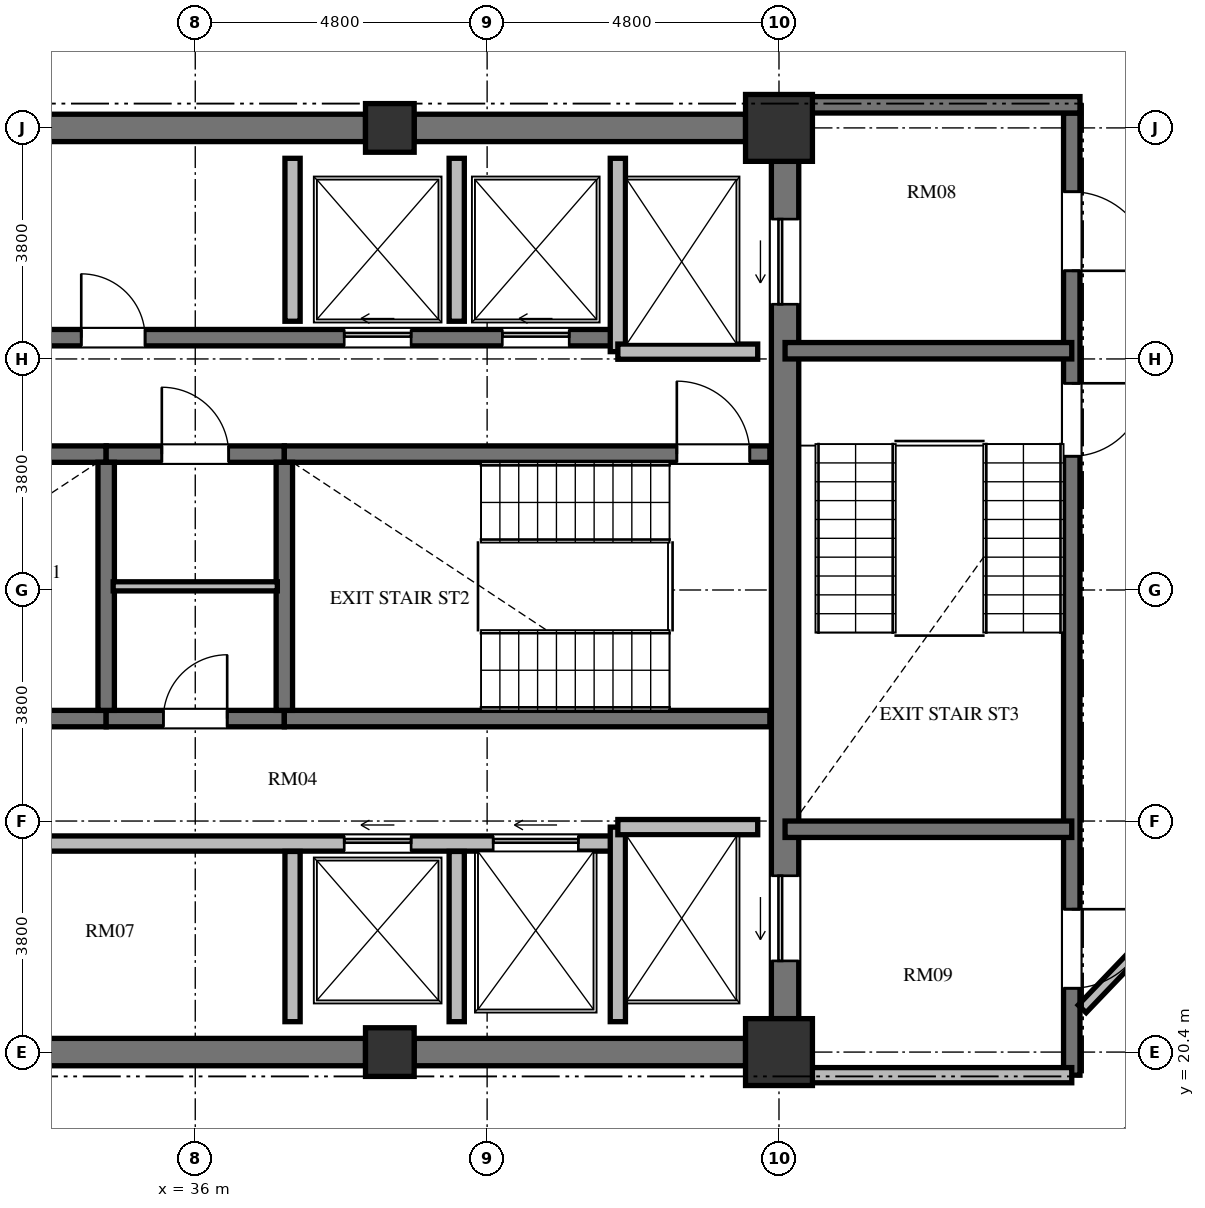
"""IFC4 building model, lengths in metres.
Left out: names, types, materials, properties, quantities, classifications, styles, units other than length and angle.
Written with IfcOpenShell. Run it as: python <this file> out.ifc"""

import sys

from ifc_helpers import new_model, si_unit, direction, frame, frame_2d, origin, origin_2d, place, context, subcontext, project, spatial, rectangle, extrude, element, fill, save


model = new_model("IFC4")
c1 = context("Model", 3, precision=1e-05, world=origin(), true_north=direction((0.0, 1.0)))
c2 = subcontext(c1, "Body", "Model", "MODEL_VIEW")
j1 = project(units=[si_unit("LENGTHUNIT", "METRE"), si_unit("PLANEANGLEUNIT", "RADIAN")], contexts=[c1])
p1 = place(None, origin())
s1 = spatial("IfcSite", under=j1, at=p1, CompositionType="ELEMENT")
p2 = place(p1, origin())
s2 = spatial("IfcBuilding", under=s1, at=p2, CompositionType="ELEMENT")
p3 = place(p2, frame((0.0, 0.0, 255.024)))
s3 = spatial("IfcBuildingStorey", under=s2, at=p3, CompositionType="ELEMENT", Elevation=255.024)
p4 = place(p3, frame((39.2, 20.4, 0.0), z_axis=(0.0, 0.0, 1.0), x_axis=(1.0, 0.0, 0.0)))
e1 = element("IfcColumn", 1, at=p4, inside=s3, PredefinedType="COLUMN", context=c2, shape_type="SweptSolid", body=[
    extrude(rectangle(XDim=0.8, YDim=0.8, at=origin_2d()), origin(), (0.0, 0.0, 1.0), 3.648),
])
for number, where, z_axis, x_axis in (
    (2, (45.6, 20.4, 0.0), (0.0, 0.0, 1.0), (1.0, 0.0, 0.0)),
    (3, (45.6, 35.6, 0.0), (0.0, 0.0, 1.0), (1.0, 0.0, 0.0)),
):
    element("IfcColumn", number, at=place(p3, frame(where, z_axis=z_axis, x_axis=x_axis)), inside=s3, PredefinedType="COLUMN", context=c2, shape_type="SweptSolid", body=[
        extrude(rectangle(XDim=1.1, YDim=1.1, at=origin_2d()), origin(), (0.0, 0.0, 1.0), 3.648),
    ])
p5 = place(p3, frame((39.2, 35.6, 0.0), z_axis=(0.0, 0.0, 1.0), x_axis=(1.0, 0.0, 0.0)))
e4 = element("IfcColumn", 4, at=p5, inside=s3, PredefinedType="COLUMN", context=c2, shape_type="SweptSolid", body=[
    extrude(rectangle(XDim=0.8, YDim=0.8, at=origin_2d()), origin(), (0.0, 0.0, 1.0), 3.648),
])
p6 = place(p3, frame((45.7, 20.95, 0.0), z_axis=(0.0, 0.0, 1.0), x_axis=(0.0, 1.0, 0.0)))
e5 = element("IfcWall", 5, at=p6, inside=s3, PredefinedType="SHEAR", context=c2, shape_type="SweptSolid", body=[
    extrude(rectangle(XDim=14.1, YDim=0.45, at=frame_2d((7.05, 0.0))), origin(), (0.0, 0.0, 1.0), 3.648),
])
p7 = place(p6, frame((11.75, 0.0, 0.0)))
e6 = element("IfcOpeningElement", 6, at=p7, cuts=e5, PredefinedType="OPENING", context=c2, shape_type="SweptSolid", body=[
    extrude(rectangle(XDim=1.4, YDim=2.3, at=frame_2d((0.7, 1.15))), frame((0.0, 0.235, 0.0), z_axis=(0.0, -1.0, 0.0), x_axis=(1.0, 0.0, 0.0)), (0.0, 0.0, 1.0), 0.47),
])
p8 = place(p6, frame((0.95, 0.0, 0.0)))
e7 = element("IfcOpeningElement", 7, at=p8, cuts=e5, PredefinedType="OPENING", context=c2, shape_type="SweptSolid", body=[
    extrude(rectangle(XDim=1.4, YDim=2.3, at=frame_2d((0.7, 1.15))), frame((0.0, 0.235, 0.0), z_axis=(0.0, -1.0, 0.0), x_axis=(1.0, 0.0, 0.0)), (0.0, 0.0, 1.0), 0.47),
])
for number, where, z_axis, x_axis in (
    (8, (33.2, 20.4, 0.0), (0.0, 0.0, 1.0), (1.0, 0.0, 0.0)),
    (9, (33.2, 35.6, 0.0), (0.0, 0.0, 1.0), (1.0, 0.0, 0.0)),
):
    element("IfcWall", number, at=place(p3, frame(where, z_axis=z_axis, x_axis=x_axis)), inside=s3, PredefinedType="SHEAR", context=c2, shape_type="SweptSolid", body=[
        extrude(rectangle(XDim=5.6, YDim=0.45, at=frame_2d((2.8, 0.0))), origin(), (0.0, 0.0, 1.0), 3.648),
    ])
for number, where, z_axis, x_axis in (
    (10, (39.6, 20.4, 0.0), (0.0, 0.0, 1.0), (1.0, 0.0, 0.0)),
    (11, (39.6, 35.6, 0.0), (0.0, 0.0, 1.0), (1.0, 0.0, 0.0)),
):
    element("IfcWall", number, at=place(p3, frame(where, z_axis=z_axis, x_axis=x_axis)), inside=s3, PredefinedType="SHEAR", context=c2, shape_type="SweptSolid", body=[
        extrude(rectangle(XDim=5.45, YDim=0.45, at=frame_2d((2.725, 0.0))), origin(), (0.0, 0.0, 1.0), 3.648),
    ])
p9 = place(p3, frame((26.55, 30.235, 0.0), z_axis=(0.0, 0.0, 1.0), x_axis=(1.0, 0.0, 0.0)))
e12 = element("IfcWall", 12, at=p9, inside=s3, PredefinedType="SHEAR", context=c2, shape_type="SweptSolid", body=[
    extrude(rectangle(XDim=7.985, YDim=0.27, at=frame_2d((3.992, 0.0))), origin(), (0.0, 0.0, 1.0), 3.648),
])
p10 = place(p3, frame((34.535, 30.235, 0.0), z_axis=(0.0, 0.0, 1.0), x_axis=(1.0, 0.0, 0.0)))
e13 = element("IfcWall", 13, at=p10, inside=s3, PredefinedType="SHEAR", context=c2, shape_type="SweptSolid", body=[
    extrude(rectangle(XDim=2.93, YDim=0.27, at=frame_2d((1.465, 0.0))), origin(), (0.0, 0.0, 1.0), 3.648),
])
p11 = place(p10, frame((0.915, 0.0, 0.0)))
e14 = element("IfcOpeningElement", 14, at=p11, cuts=e13, PredefinedType="OPENING", context=c2, shape_type="SweptSolid", body=[
    extrude(rectangle(XDim=1.1, YDim=2.15, at=frame_2d((0.55, 1.075))), frame((0.0, 0.145, 0.0), z_axis=(0.0, -1.0, 0.0), x_axis=(1.0, 0.0, 0.0)), (0.0, 0.0, 1.0), 0.29),
])
p12 = place(p3, frame((37.465, 30.235, 0.0), z_axis=(0.0, 0.0, 1.0), x_axis=(1.0, 0.0, 0.0)))
e15 = element("IfcWall", 15, at=p12, inside=s3, PredefinedType="SHEAR", context=c2, shape_type="SweptSolid", body=[
    extrude(rectangle(XDim=7.985, YDim=0.27, at=frame_2d((3.992, 0.0))), origin(), (0.0, 0.0, 1.0), 3.648),
])
p13 = place(p12, frame((6.455, 0.0, 0.0)))
e16 = element("IfcOpeningElement", 16, at=p13, cuts=e15, PredefinedType="OPENING", context=c2, shape_type="SweptSolid", body=[
    extrude(rectangle(XDim=1.2, YDim=2.15, at=frame_2d((0.6, 1.075))), frame((0.0, 0.145, 0.0), z_axis=(0.0, -1.0, 0.0), x_axis=(1.0, 0.0, 0.0)), (0.0, 0.0, 1.0), 0.29),
])
p14 = place(p3, frame((26.55, 25.885, 0.0), z_axis=(0.0, 0.0, 1.0), x_axis=(1.0, 0.0, 0.0)))
e17 = element("IfcWall", 17, at=p14, inside=s3, PredefinedType="SHEAR", context=c2, shape_type="SweptSolid", body=[
    extrude(rectangle(XDim=7.985, YDim=0.27, at=frame_2d((3.992, 0.0))), origin(), (0.0, 0.0, 1.0), 3.648),
])
p15 = place(p3, frame((34.535, 25.885, 0.0), z_axis=(0.0, 0.0, 1.0), x_axis=(1.0, 0.0, 0.0)))
e18 = element("IfcWall", 18, at=p15, inside=s3, PredefinedType="SHEAR", context=c2, shape_type="SweptSolid", body=[
    extrude(rectangle(XDim=2.93, YDim=0.27, at=frame_2d((1.465, 0.0))), origin(), (0.0, 0.0, 1.0), 3.648),
])
p16 = place(p15, frame((0.94, 0.0, 0.0)))
e19 = element("IfcOpeningElement", 19, at=p16, cuts=e18, PredefinedType="OPENING", context=c2, shape_type="SweptSolid", body=[
    extrude(rectangle(XDim=1.05, YDim=2.15, at=frame_2d((0.525, 1.075))), frame((0.0, 0.145, 0.0), z_axis=(0.0, -1.0, 0.0), x_axis=(1.0, 0.0, 0.0)), (0.0, 0.0, 1.0), 0.29),
])
p17 = place(p3, frame((37.465, 25.885, 0.0), z_axis=(0.0, 0.0, 1.0), x_axis=(1.0, 0.0, 0.0)))
e20 = element("IfcWall", 20, at=p17, inside=s3, PredefinedType="SHEAR", context=c2, shape_type="SweptSolid", body=[
    extrude(rectangle(XDim=7.985, YDim=0.27, at=frame_2d((3.992, 0.0))), origin(), (0.0, 0.0, 1.0), 3.648),
])
for number, where, z_axis, x_axis in (
    (21, (34.535, 26.02, 0.0), (0.0, 0.0, 1.0), (0.0, 1.0, 0.0)),
    (22, (37.465, 26.02, 0.0), (0.0, 0.0, 1.0), (0.0, 1.0, 0.0)),
):
    element("IfcWall", number, at=place(p3, frame(where, z_axis=z_axis, x_axis=x_axis)), inside=s3, PredefinedType="SHEAR", context=c2, shape_type="SweptSolid", body=[
        extrude(rectangle(XDim=4.08, YDim=0.27, at=frame_2d((2.04, 0.0))), origin(), (0.0, 0.0, 1.0), 3.648),
    ])
p18 = place(p3, frame((34.65, 28.06, 0.0), z_axis=(0.0, 0.0, 1.0), x_axis=(1.0, 0.0, 0.0)))
e23 = element("IfcWall", 23, at=p18, inside=s3, PredefinedType="PARTITIONING", context=c2, shape_type="SweptSolid", body=[
    extrude(rectangle(XDim=2.7, YDim=0.15, at=frame_2d((1.35, 0.0))), origin(), (0.0, 0.0, 1.0), 3.448),
])
p19 = place(p3, frame((26.55, 32.15, 0.0), z_axis=(0.0, 0.0, 1.0), x_axis=(1.0, 0.0, 0.0)))
e24 = element("IfcWall", 24, at=p19, inside=s3, PredefinedType="SHEAR", context=c2, shape_type="SweptSolid", body=[
    extrude(rectangle(XDim=16.4, YDim=0.27, at=frame_2d((8.2, 0.0))), origin(), (0.0, 0.0, 1.0), 3.648),
])
p20 = place(p19, frame((2.175, 0.0, 0.0)))
e25 = element("IfcOpeningElement", 25, at=p20, cuts=e24, PredefinedType="OPENING", context=c2, shape_type="SweptSolid", body=[
    extrude(rectangle(XDim=1.05, YDim=2.15, at=frame_2d((0.525, 1.075))), frame((0.0, 0.145, 0.0), z_axis=(0.0, -1.0, 0.0), x_axis=(1.0, 0.0, 0.0)), (0.0, 0.0, 1.0), 0.29),
])
p21 = place(p19, frame((7.575, 0.0, 0.0)))
e26 = element("IfcOpeningElement", 26, at=p21, cuts=e24, PredefinedType="OPENING", context=c2, shape_type="SweptSolid", body=[
    extrude(rectangle(XDim=1.05, YDim=2.15, at=frame_2d((0.525, 1.075))), frame((0.0, 0.145, 0.0), z_axis=(0.0, -1.0, 0.0), x_axis=(1.0, 0.0, 0.0)), (0.0, 0.0, 1.0), 0.29),
])
p22 = place(p19, frame((11.9, 0.0, 0.0)))
e27 = element("IfcOpeningElement", 27, at=p22, cuts=e24, PredefinedType="OPENING", context=c2, shape_type="SweptSolid", body=[
    extrude(rectangle(XDim=1.1, YDim=2.2, at=frame_2d((0.55, 1.1))), frame((0.0, 0.145, 0.0), z_axis=(0.0, -1.0, 0.0), x_axis=(1.0, 0.0, 0.0)), (0.0, 0.0, 1.0), 0.29),
])
p23 = place(p19, frame((14.5, 0.0, 0.0)))
e28 = element("IfcOpeningElement", 28, at=p23, cuts=e24, PredefinedType="OPENING", context=c2, shape_type="SweptSolid", body=[
    extrude(rectangle(XDim=1.1, YDim=2.2, at=frame_2d((0.55, 1.1))), frame((0.0, 0.145, 0.0), z_axis=(0.0, -1.0, 0.0), x_axis=(1.0, 0.0, 0.0)), (0.0, 0.0, 1.0), 0.29),
])
p24 = place(p3, frame((26.75, 23.83, 0.0), z_axis=(0.0, 0.0, 1.0), x_axis=(1.0, 0.0, 0.0)))
e29 = element("IfcWall", 29, at=p24, inside=s3, PredefinedType="SOLIDWALL", context=c2, shape_type="SweptSolid", body=[
    extrude(rectangle(XDim=16.2, YDim=0.25, at=frame_2d((8.1, 0.0))), origin(), (0.0, 0.0, 1.0), 3.448),
])
p25 = place(p24, frame((4.75, 0.0, 0.0)))
e30 = element("IfcOpeningElement", 30, at=p25, cuts=e29, PredefinedType="OPENING", context=c2, shape_type="SweptSolid", body=[
    extrude(rectangle(XDim=1.4, YDim=2.2, at=frame_2d((0.7, 1.1))), frame((0.0, 0.135, 0.0), z_axis=(0.0, -1.0, 0.0), x_axis=(1.0, 0.0, 0.0)), (0.0, 0.0, 1.0), 0.27),
])
p26 = place(p24, frame((11.7, 0.0, 0.0)))
e31 = element("IfcOpeningElement", 31, at=p26, cuts=e29, PredefinedType="OPENING", context=c2, shape_type="SweptSolid", body=[
    extrude(rectangle(XDim=1.1, YDim=2.2, at=frame_2d((0.55, 1.1))), frame((0.0, 0.135, 0.0), z_axis=(0.0, -1.0, 0.0), x_axis=(1.0, 0.0, 0.0)), (0.0, 0.0, 1.0), 0.27),
])
p27 = place(p24, frame((14.15, 0.0, 0.0)))
e32 = element("IfcOpeningElement", 32, at=p27, cuts=e29, PredefinedType="OPENING", context=c2, shape_type="SweptSolid", body=[
    extrude(rectangle(XDim=1.4, YDim=2.3, at=frame_2d((0.7, 1.15))), frame((0.0, 0.135, 0.0), z_axis=(0.0, -1.0, 0.0), x_axis=(1.0, 0.0, 0.0)), (0.0, 0.0, 1.0), 0.27),
])
p28 = place(p3, frame((42.95, 31.92, 0.0), z_axis=(0.0, 0.0, 1.0), x_axis=(0.0, 1.0, 0.0)))
e33 = element("IfcWall", 33, at=p28, inside=s3, PredefinedType="SOLIDWALL", context=c2, shape_type="SweptSolid", body=[
    extrude(rectangle(XDim=3.18, YDim=0.25, at=frame_2d((1.59, 0.0))), origin(), (0.0, 0.0, 1.0), 3.448),
])
p29 = place(p3, frame((42.95, 31.92, 0.0), z_axis=(0.0, 0.0, 1.0), x_axis=(1.0, 0.0, 0.0)))
e34 = element("IfcWall", 34, at=p29, inside=s3, PredefinedType="SOLIDWALL", context=c2, shape_type="SweptSolid", body=[
    extrude(rectangle(XDim=2.3, YDim=0.25, at=frame_2d((1.15, 0.0))), origin(), (0.0, 0.0, 1.0), 3.448),
])
p30 = place(p3, frame((42.95, 20.9, 0.0), z_axis=(0.0, 0.0, 1.0), x_axis=(0.0, 1.0, 0.0)))
e35 = element("IfcWall", 35, at=p30, inside=s3, PredefinedType="SOLIDWALL", context=c2, shape_type="SweptSolid", body=[
    extrude(rectangle(XDim=3.2, YDim=0.25, at=frame_2d((1.6, 0.0))), origin(), (0.0, 0.0, 1.0), 3.448),
])
p31 = place(p3, frame((42.95, 24.1, 0.0), z_axis=(0.0, 0.0, 1.0), x_axis=(1.0, 0.0, 0.0)))
e36 = element("IfcWall", 36, at=p31, inside=s3, PredefinedType="SOLIDWALL", context=c2, shape_type="SweptSolid", body=[
    extrude(rectangle(XDim=2.3, YDim=0.25, at=frame_2d((1.15, 0.0))), origin(), (0.0, 0.0, 1.0), 3.448),
])
p32 = place(p3, frame((37.6, 32.42, 0.0), z_axis=(0.0, 0.0, 1.0), x_axis=(0.0, 1.0, 0.0)))
e37 = element("IfcWall", 37, at=p32, inside=s3, PredefinedType="SOLIDWALL", context=c2, shape_type="SweptSolid", body=[
    extrude(rectangle(XDim=2.68, YDim=0.25, at=frame_2d((1.34, 0.0))), origin(), (0.0, 0.0, 1.0), 3.448),
])
p33 = place(p3, frame((37.6, 20.9, 0.0), z_axis=(0.0, 0.0, 1.0), x_axis=(0.0, 1.0, 0.0)))
e38 = element("IfcWall", 38, at=p33, inside=s3, PredefinedType="SOLIDWALL", context=c2, shape_type="SweptSolid", body=[
    extrude(rectangle(XDim=2.8, YDim=0.25, at=frame_2d((1.4, 0.0))), origin(), (0.0, 0.0, 1.0), 3.448),
])
p34 = place(p3, frame((40.3, 32.42, 0.0), z_axis=(0.0, 0.0, 1.0), x_axis=(0.0, 1.0, 0.0)))
e39 = element("IfcWall", 39, at=p34, inside=s3, PredefinedType="SOLIDWALL", context=c2, shape_type="SweptSolid", body=[
    extrude(rectangle(XDim=2.68, YDim=0.25, at=frame_2d((1.34, 0.0))), origin(), (0.0, 0.0, 1.0), 3.448),
])
p35 = place(p3, frame((40.3, 20.9, 0.0), z_axis=(0.0, 0.0, 1.0), x_axis=(0.0, 1.0, 0.0)))
e40 = element("IfcWall", 40, at=p35, inside=s3, PredefinedType="SOLIDWALL", context=c2, shape_type="SweptSolid", body=[
    extrude(rectangle(XDim=2.8, YDim=0.25, at=frame_2d((1.4, 0.0))), origin(), (0.0, 0.0, 1.0), 3.448),
])
p36 = place(p3, frame((50.415, 35.845, 0.0), z_axis=(0.0, 0.0, 1.0), x_axis=(0.0, -1.0, 0.0)))
e41 = element("IfcWall", 41, at=p36, inside=s3, PredefinedType="SHEAR", context=c2, shape_type="SweptSolid", body=[
    extrude(rectangle(XDim=15.825, YDim=0.27, at=frame_2d((7.913, 0.0))), origin(), (0.0, 0.0, 1.0), 3.648),
])
p37 = place(p36, frame((4.445, 0.0, 0.0)))
e42 = element("IfcOpeningElement", 42, at=p37, cuts=e41, PredefinedType="OPENING", context=c2, shape_type="SweptSolid", body=[
    extrude(rectangle(XDim=1.2, YDim=2.15, at=frame_2d((0.6, 1.075))), frame((0.0, 0.145, 0.0), z_axis=(0.0, -1.0, 0.0), x_axis=(1.0, 0.0, 0.0)), (0.0, 0.0, 1.0), 0.29),
])
p38 = place(p36, frame((1.295, 0.0, 0.0)))
e43 = element("IfcOpeningElement", 43, at=p38, cuts=e41, PredefinedType="OPENING", context=c2, shape_type="SweptSolid", body=[
    extrude(rectangle(XDim=1.3, YDim=2.2, at=frame_2d((0.65, 1.1))), frame((0.0, 0.145, 0.0), z_axis=(0.0, -1.0, 0.0), x_axis=(1.0, 0.0, 0.0)), (0.0, 0.0, 1.0), 0.29),
])
p39 = place(p36, frame((13.095, 0.0, 0.0)))
e44 = element("IfcOpeningElement", 44, at=p39, cuts=e41, PredefinedType="OPENING", context=c2, shape_type="SweptSolid", body=[
    extrude(rectangle(XDim=1.3, YDim=2.2, at=frame_2d((0.65, 1.1))), frame((0.0, 0.145, 0.0), z_axis=(0.0, -1.0, 0.0), x_axis=(1.0, 0.0, 0.0)), (0.0, 0.0, 1.0), 0.29),
])
p40 = place(p3, frame((45.925, 35.98, 0.0), z_axis=(0.0, 0.0, 1.0), x_axis=(1.0, 0.0, 0.0)))
e45 = element("IfcWall", 45, at=p40, inside=s3, PredefinedType="SHEAR", context=c2, shape_type="SweptSolid", body=[
    extrude(rectangle(XDim=4.625, YDim=0.27, at=frame_2d((2.312, 0.0))), origin(), (0.0, 0.0, 1.0), 3.648),
])
for number, where, z_axis, x_axis in (
    (46, (45.7, 31.935, 0.0), (0.0, 0.0, 1.0), (1.0, 0.0, 0.0)),
    (47, (45.7, 24.065, 0.0), (0.0, 0.0, 1.0), (1.0, 0.0, 0.0)),
):
    element("IfcWall", number, at=place(p3, frame(where, z_axis=z_axis, x_axis=x_axis)), inside=s3, PredefinedType="SHEAR", context=c2, shape_type="SweptSolid", body=[
        extrude(rectangle(XDim=4.715, YDim=0.27, at=frame_2d((2.357, 0.0))), origin(), (0.0, 0.0, 1.0), 3.648),
    ])
p41 = place(p3, frame((45.7, 20.02, 0.0), z_axis=(0.0, 0.0, 1.0), x_axis=(1.0, 0.0, 0.0)))
e48 = element("IfcWall", 48, at=p41, inside=s3, PredefinedType="SOLIDWALL", context=c2, shape_type="SweptSolid", body=[
    extrude(rectangle(XDim=4.715, YDim=0.25, at=frame_2d((2.357, 0.0))), origin(), (0.0, 0.0, 1.0), 3.448),
])
p42 = place(p3, frame((53.078, 23.714, 0.0), z_axis=(0.0, 0.0, 1.0), x_axis=(-0.691353379446, -0.722516785085, 0.0)))
e49 = element("IfcWall", 49, at=p42, inside=s3, PredefinedType="PARTITIONING", context=c2, shape_type="SweptSolid", body=[
    extrude(rectangle(XDim=3.604, YDim=0.18, at=frame_2d((1.802, 0.0))), origin(), (0.0, 0.0, 1.0), 3.448),
])
p43 = place(p13, origin())
e50 = element("IfcDoor", 50, at=p43, inside=s3, OperationType="SINGLE_SWING_LEFT", PredefinedType="DOOR", context=c2, shape_type="SweptSolid", body=[
    extrude(rectangle(XDim=1.2, YDim=2.15, at=frame_2d((0.6, 1.075))), frame((0.0, 0.025, 0.0), z_axis=(0.0, -1.0, 0.0), x_axis=(1.0, 0.0, 0.0)), (0.0, 0.0, 1.0), 0.05),
])
fill(e16, e50)
p44 = place(p16, origin())
e51 = element("IfcDoor", 51, at=p44, inside=s3, OperationType="SINGLE_SWING_RIGHT", PredefinedType="DOOR", context=c2, shape_type="SweptSolid", body=[
    extrude(rectangle(XDim=1.05, YDim=2.15, at=frame_2d((0.525, 1.075))), frame((0.0, 0.025, 0.0), z_axis=(0.0, -1.0, 0.0), x_axis=(1.0, 0.0, 0.0)), (0.0, 0.0, 1.0), 0.05),
])
fill(e19, e51)
p45 = place(p11, origin())
e52 = element("IfcDoor", 52, at=p45, inside=s3, OperationType="SINGLE_SWING_LEFT", PredefinedType="DOOR", context=c2, shape_type="SweptSolid", body=[
    extrude(rectangle(XDim=1.1, YDim=2.15, at=frame_2d((0.55, 1.075))), frame((0.0, 0.025, 0.0), z_axis=(0.0, -1.0, 0.0), x_axis=(1.0, 0.0, 0.0)), (0.0, 0.0, 1.0), 0.05),
])
fill(e14, e52)
p46 = place(p21, origin())
e53 = element("IfcDoor", 53, at=p46, inside=s3, OperationType="SINGLE_SWING_LEFT", PredefinedType="DOOR", context=c2, shape_type="SweptSolid", body=[
    extrude(rectangle(XDim=1.05, YDim=2.15, at=frame_2d((0.525, 1.075))), frame((0.0, 0.025, 0.0), z_axis=(0.0, -1.0, 0.0), x_axis=(1.0, 0.0, 0.0)), (0.0, 0.0, 1.0), 0.05),
])
fill(e26, e53)
p47 = place(p22, origin())
e54 = element("IfcDoor", 54, at=p47, inside=s3, OperationType="SLIDING_TO_LEFT", PredefinedType="DOOR", context=c2, shape_type="SweptSolid", body=[
    extrude(rectangle(XDim=1.1, YDim=2.2, at=frame_2d((0.55, 1.1))), frame((0.0, 0.025, 0.0), z_axis=(0.0, -1.0, 0.0), x_axis=(1.0, 0.0, 0.0)), (0.0, 0.0, 1.0), 0.05),
])
fill(e27, e54)
p48 = place(p23, origin())
e55 = element("IfcDoor", 55, at=p48, inside=s3, OperationType="SLIDING_TO_LEFT", PredefinedType="DOOR", context=c2, shape_type="SweptSolid", body=[
    extrude(rectangle(XDim=1.1, YDim=2.2, at=frame_2d((0.55, 1.1))), frame((0.0, 0.025, 0.0), z_axis=(0.0, -1.0, 0.0), x_axis=(1.0, 0.0, 0.0)), (0.0, 0.0, 1.0), 0.05),
])
fill(e28, e55)
p49 = place(p26, origin())
e56 = element("IfcDoor", 56, at=p49, inside=s3, OperationType="SLIDING_TO_LEFT", PredefinedType="DOOR", context=c2, shape_type="SweptSolid", body=[
    extrude(rectangle(XDim=1.1, YDim=2.2, at=frame_2d((0.55, 1.1))), frame((0.0, 0.025, 0.0), z_axis=(0.0, -1.0, 0.0), x_axis=(1.0, 0.0, 0.0)), (0.0, 0.0, 1.0), 0.05),
])
fill(e31, e56)
p50 = place(p7, origin())
e57 = element("IfcDoor", 57, at=p50, inside=s3, OperationType="SLIDING_TO_LEFT", PredefinedType="DOOR", context=c2, shape_type="SweptSolid", body=[
    extrude(rectangle(XDim=1.4, YDim=2.3, at=frame_2d((0.7, 1.15))), frame((0.0, 0.025, 0.0), z_axis=(0.0, -1.0, 0.0), x_axis=(1.0, 0.0, 0.0)), (0.0, 0.0, 1.0), 0.05),
])
fill(e6, e57)
p51 = place(p8, origin())
e58 = element("IfcDoor", 58, at=p51, inside=s3, OperationType="SLIDING_TO_LEFT", PredefinedType="DOOR", context=c2, shape_type="SweptSolid", body=[
    extrude(rectangle(XDim=1.4, YDim=2.3, at=frame_2d((0.7, 1.15))), frame((0.0, 0.025, 0.0), z_axis=(0.0, -1.0, 0.0), x_axis=(1.0, 0.0, 0.0)), (0.0, 0.0, 1.0), 0.05),
])
fill(e7, e58)
p52 = place(p27, origin())
e59 = element("IfcDoor", 59, at=p52, inside=s3, OperationType="SLIDING_TO_LEFT", PredefinedType="DOOR", context=c2, shape_type="SweptSolid", body=[
    extrude(rectangle(XDim=1.4, YDim=2.3, at=frame_2d((0.7, 1.15))), frame((0.0, 0.025, 0.0), z_axis=(0.0, -1.0, 0.0), x_axis=(1.0, 0.0, 0.0)), (0.0, 0.0, 1.0), 0.05),
])
fill(e32, e59)
p53 = place(p37, origin())
e60 = element("IfcDoor", 60, at=p53, inside=s3, OperationType="SINGLE_SWING_LEFT", PredefinedType="DOOR", context=c2, shape_type="SweptSolid", body=[
    extrude(rectangle(XDim=1.2, YDim=2.15, at=frame_2d((0.6, 1.075))), frame((0.0, 0.025, 0.0), z_axis=(0.0, -1.0, 0.0), x_axis=(1.0, 0.0, 0.0)), (0.0, 0.0, 1.0), 0.05),
])
fill(e42, e60)
p54 = place(p38, origin())
e61 = element("IfcDoor", 61, at=p54, inside=s3, OperationType="SINGLE_SWING_RIGHT", PredefinedType="DOOR", context=c2, shape_type="SweptSolid", body=[
    extrude(rectangle(XDim=1.3, YDim=2.2, at=frame_2d((0.65, 1.1))), frame((0.0, 0.025, 0.0), z_axis=(0.0, -1.0, 0.0), x_axis=(1.0, 0.0, 0.0)), (0.0, 0.0, 1.0), 0.05),
])
fill(e43, e61)
p55 = place(p39, origin())
e62 = element("IfcDoor", 62, at=p55, inside=s3, OperationType="SINGLE_SWING_LEFT", PredefinedType="DOOR", context=c2, shape_type="SweptSolid", body=[
    extrude(rectangle(XDim=1.3, YDim=2.2, at=frame_2d((0.65, 1.1))), frame((0.0, 0.025, 0.0), z_axis=(0.0, -1.0, 0.0), x_axis=(1.0, 0.0, 0.0)), (0.0, 0.0, 1.0), 0.05),
])
fill(e44, e62)
save(model, sys.argv[1])
